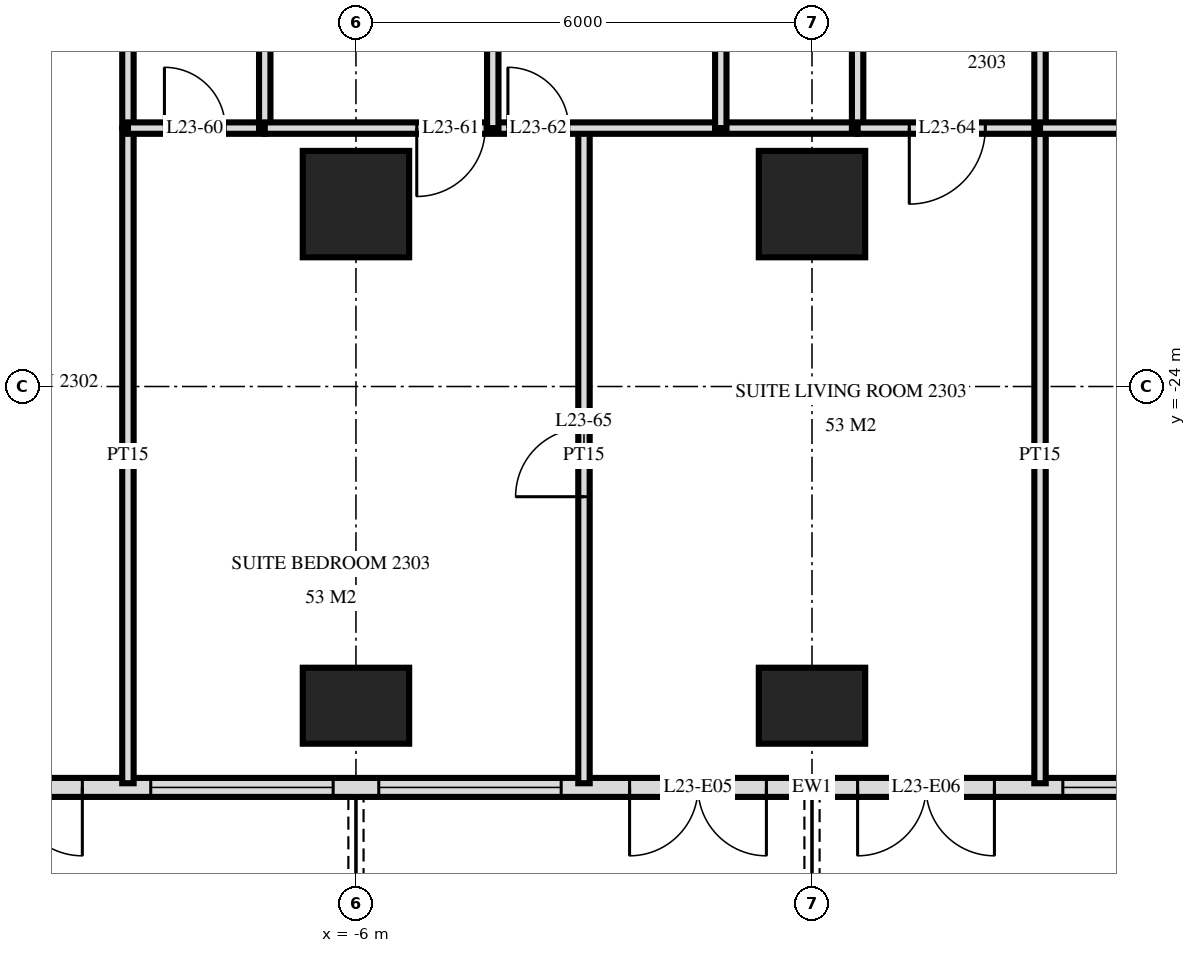
"""IFC4 building model, lengths in metres.
Left out: names, types, materials, properties, quantities, classifications, styles, units other than length and angle.
Written with IfcOpenShell. Run it as: python <this file> out.ifc"""

import sys

from ifc_helpers import new_model, si_unit, direction, frame, frame_2d, origin, origin_2d, place, context, subcontext, project, spatial, rectangle, extrude, element, fill, save


model = new_model("IFC4")
c1 = context("Model", 3, precision=1e-05, world=origin(), true_north=direction((0.0, 1.0)))
c2 = subcontext(c1, "Body", "Model", "MODEL_VIEW")
j1 = project(units=[si_unit("LENGTHUNIT", "METRE"), si_unit("PLANEANGLEUNIT", "RADIAN")], contexts=[c1])
p1 = place(None, origin())
s1 = spatial("IfcSite", under=j1, at=p1, CompositionType="ELEMENT")
p2 = place(p1, origin())
s2 = spatial("IfcBuilding", under=s1, at=p2, CompositionType="ELEMENT")
p3 = place(p2, frame((0.0, 0.0, 92.4)))
s3 = spatial("IfcBuildingStorey", under=s2, at=p3, CompositionType="ELEMENT", Elevation=92.4)
p4 = place(p3, frame((-6.0, -28.2, 0.0), z_axis=(0.0, 0.0, 1.0), x_axis=(1.0, 0.0, 0.0)))
e1 = element("IfcColumn", 1, at=p4, inside=s3, PredefinedType="COLUMN", context=c2, shape_type="SweptSolid", body=[
    extrude(rectangle(XDim=1.4, YDim=1.0, at=origin_2d()), origin(), (0.0, 0.0, 1.0), 3.6),
])
p5 = place(p3, frame((-6.0, -21.6, 0.0), z_axis=(0.0, 0.0, 1.0), x_axis=(1.0, 0.0, 0.0)))
e2 = element("IfcColumn", 2, at=p5, inside=s3, PredefinedType="COLUMN", context=c2, shape_type="SweptSolid", body=[
    extrude(rectangle(XDim=1.4, YDim=1.4, at=origin_2d()), origin(), (0.0, 0.0, 1.0), 3.6),
])
p6 = place(p3, frame((0.0, -28.2, 0.0), z_axis=(0.0, 0.0, 1.0), x_axis=(1.0, 0.0, 0.0)))
e3 = element("IfcColumn", 3, at=p6, inside=s3, PredefinedType="COLUMN", context=c2, shape_type="SweptSolid", body=[
    extrude(rectangle(XDim=1.4, YDim=1.0, at=origin_2d()), origin(), (0.0, 0.0, 1.0), 3.6),
])
p7 = place(p3, frame((0.0, -21.6, 0.0), z_axis=(0.0, 0.0, 1.0), x_axis=(1.0, 0.0, 0.0)))
e4 = element("IfcColumn", 4, at=p7, inside=s3, PredefinedType="COLUMN", context=c2, shape_type="SweptSolid", body=[
    extrude(rectangle(XDim=1.4, YDim=1.4, at=origin_2d()), origin(), (0.0, 0.0, 1.0), 3.6),
])
p8 = place(p3, frame((-28.775, -29.275, 0.0), z_axis=(0.0, 0.0, 1.0), x_axis=(1.0, 0.0, 0.0)))
e5 = element("IfcWall", 5, at=p8, inside=s3, PredefinedType="SOLIDWALL", context=c2, shape_type="SweptSolid", body=[
    extrude(rectangle(XDim=57.551, YDim=0.25, at=frame_2d((28.775, 0.0))), origin(), (0.0, 0.0, 1.0), 3.32),
])
p9 = place(p8, frame((0.575, 0.0, 0.0)))
e6 = element("IfcOpeningElement", 6, at=p9, cuts=e5, PredefinedType="OPENING", context=c2, shape_type="SweptSolid", body=[
    extrude(rectangle(XDim=1.8, YDim=2.4, at=frame_2d((0.9, 1.2))), frame((0.0, 0.135, 0.0), z_axis=(0.0, -1.0, 0.0), x_axis=(1.0, 0.0, 0.0)), (0.0, 0.0, 1.0), 0.27),
])
p10 = place(p8, frame((5.075, 0.0, 0.3)))
e7 = element("IfcOpeningElement", 7, at=p10, cuts=e5, PredefinedType="OPENING", context=c2, shape_type="SweptSolid", body=[
    extrude(rectangle(XDim=2.4, YDim=2.1, at=frame_2d((1.2, 1.05))), frame((0.0, 0.135, 0.0), z_axis=(0.0, -1.0, 0.0), x_axis=(1.0, 0.0, 0.0)), (0.0, 0.0, 1.0), 0.27),
])
p11 = place(p8, frame((8.375, 0.0, 0.0)))
e8 = element("IfcOpeningElement", 8, at=p11, cuts=e5, PredefinedType="OPENING", context=c2, shape_type="SweptSolid", body=[
    extrude(rectangle(XDim=1.8, YDim=2.4, at=frame_2d((0.9, 1.2))), frame((0.0, 0.135, 0.0), z_axis=(0.0, -1.0, 0.0), x_axis=(1.0, 0.0, 0.0)), (0.0, 0.0, 1.0), 0.27),
])
p12 = place(p8, frame((11.375, 0.0, 0.0)))
e9 = element("IfcOpeningElement", 9, at=p12, cuts=e5, PredefinedType="OPENING", context=c2, shape_type="SweptSolid", body=[
    extrude(rectangle(XDim=1.8, YDim=2.4, at=frame_2d((0.9, 1.2))), frame((0.0, 0.135, 0.0), z_axis=(0.0, -1.0, 0.0), x_axis=(1.0, 0.0, 0.0)), (0.0, 0.0, 1.0), 0.27),
])
p13 = place(p8, frame((14.075, 0.0, 0.3)))
e10 = element("IfcOpeningElement", 10, at=p13, cuts=e5, PredefinedType="OPENING", context=c2, shape_type="SweptSolid", body=[
    extrude(rectangle(XDim=2.4, YDim=2.1, at=frame_2d((1.2, 1.05))), frame((0.0, 0.135, 0.0), z_axis=(0.0, -1.0, 0.0), x_axis=(1.0, 0.0, 0.0)), (0.0, 0.0, 1.0), 0.27),
])
p14 = place(p8, frame((17.375, 0.0, 0.0)))
e11 = element("IfcOpeningElement", 11, at=p14, cuts=e5, PredefinedType="OPENING", context=c2, shape_type="SweptSolid", body=[
    extrude(rectangle(XDim=1.8, YDim=2.4, at=frame_2d((0.9, 1.2))), frame((0.0, 0.135, 0.0), z_axis=(0.0, -1.0, 0.0), x_axis=(1.0, 0.0, 0.0)), (0.0, 0.0, 1.0), 0.27),
])
p15 = place(p8, frame((20.075, 0.0, 0.3)))
e12 = element("IfcOpeningElement", 12, at=p15, cuts=e5, PredefinedType="OPENING", context=c2, shape_type="SweptSolid", body=[
    extrude(rectangle(XDim=2.4, YDim=2.1, at=frame_2d((1.2, 1.05))), frame((0.0, 0.135, 0.0), z_axis=(0.0, -1.0, 0.0), x_axis=(1.0, 0.0, 0.0)), (0.0, 0.0, 1.0), 0.27),
])
p16 = place(p8, frame((23.075, 0.0, 0.3)))
e13 = element("IfcOpeningElement", 13, at=p16, cuts=e5, PredefinedType="OPENING", context=c2, shape_type="SweptSolid", body=[
    extrude(rectangle(XDim=2.4, YDim=2.1, at=frame_2d((1.2, 1.05))), frame((0.0, 0.135, 0.0), z_axis=(0.0, -1.0, 0.0), x_axis=(1.0, 0.0, 0.0)), (0.0, 0.0, 1.0), 0.27),
])
p17 = place(p8, frame((26.375, 0.0, 0.0)))
e14 = element("IfcOpeningElement", 14, at=p17, cuts=e5, PredefinedType="OPENING", context=c2, shape_type="SweptSolid", body=[
    extrude(rectangle(XDim=1.8, YDim=2.4, at=frame_2d((0.9, 1.2))), frame((0.0, 0.135, 0.0), z_axis=(0.0, -1.0, 0.0), x_axis=(1.0, 0.0, 0.0)), (0.0, 0.0, 1.0), 0.27),
])
p18 = place(p8, frame((29.375, 0.0, 0.0)))
e15 = element("IfcOpeningElement", 15, at=p18, cuts=e5, PredefinedType="OPENING", context=c2, shape_type="SweptSolid", body=[
    extrude(rectangle(XDim=1.8, YDim=2.4, at=frame_2d((0.9, 1.2))), frame((0.0, 0.135, 0.0), z_axis=(0.0, -1.0, 0.0), x_axis=(1.0, 0.0, 0.0)), (0.0, 0.0, 1.0), 0.27),
])
p19 = place(p8, frame((32.075, 0.0, 0.3)))
e16 = element("IfcOpeningElement", 16, at=p19, cuts=e5, PredefinedType="OPENING", context=c2, shape_type="SweptSolid", body=[
    extrude(rectangle(XDim=2.4, YDim=2.1, at=frame_2d((1.2, 1.05))), frame((0.0, 0.135, 0.0), z_axis=(0.0, -1.0, 0.0), x_axis=(1.0, 0.0, 0.0)), (0.0, 0.0, 1.0), 0.27),
])
p20 = place(p8, frame((35.375, 0.0, 0.0)))
e17 = element("IfcOpeningElement", 17, at=p20, cuts=e5, PredefinedType="OPENING", context=c2, shape_type="SweptSolid", body=[
    extrude(rectangle(XDim=1.8, YDim=2.4, at=frame_2d((0.9, 1.2))), frame((0.0, 0.135, 0.0), z_axis=(0.0, -1.0, 0.0), x_axis=(1.0, 0.0, 0.0)), (0.0, 0.0, 1.0), 0.27),
])
p21 = place(p8, frame((38.075, 0.0, 0.3)))
e18 = element("IfcOpeningElement", 18, at=p21, cuts=e5, PredefinedType="OPENING", context=c2, shape_type="SweptSolid", body=[
    extrude(rectangle(XDim=2.4, YDim=2.1, at=frame_2d((1.2, 1.05))), frame((0.0, 0.135, 0.0), z_axis=(0.0, -1.0, 0.0), x_axis=(1.0, 0.0, 0.0)), (0.0, 0.0, 1.0), 0.27),
])
p22 = place(p8, frame((41.075, 0.0, 0.3)))
e19 = element("IfcOpeningElement", 19, at=p22, cuts=e5, PredefinedType="OPENING", context=c2, shape_type="SweptSolid", body=[
    extrude(rectangle(XDim=2.4, YDim=2.1, at=frame_2d((1.2, 1.05))), frame((0.0, 0.135, 0.0), z_axis=(0.0, -1.0, 0.0), x_axis=(1.0, 0.0, 0.0)), (0.0, 0.0, 1.0), 0.27),
])
p23 = place(p8, frame((44.375, 0.0, 0.0)))
e20 = element("IfcOpeningElement", 20, at=p23, cuts=e5, PredefinedType="OPENING", context=c2, shape_type="SweptSolid", body=[
    extrude(rectangle(XDim=1.8, YDim=2.4, at=frame_2d((0.9, 1.2))), frame((0.0, 0.135, 0.0), z_axis=(0.0, -1.0, 0.0), x_axis=(1.0, 0.0, 0.0)), (0.0, 0.0, 1.0), 0.27),
])
p24 = place(p8, frame((47.075, 0.0, 0.3)))
e21 = element("IfcOpeningElement", 21, at=p24, cuts=e5, PredefinedType="OPENING", context=c2, shape_type="SweptSolid", body=[
    extrude(rectangle(XDim=2.4, YDim=2.1, at=frame_2d((1.2, 1.05))), frame((0.0, 0.135, 0.0), z_axis=(0.0, -1.0, 0.0), x_axis=(1.0, 0.0, 0.0)), (0.0, 0.0, 1.0), 0.27),
])
p25 = place(p8, frame((50.375, 0.0, 0.0)))
e22 = element("IfcOpeningElement", 22, at=p25, cuts=e5, PredefinedType="OPENING", context=c2, shape_type="SweptSolid", body=[
    extrude(rectangle(XDim=1.8, YDim=2.4, at=frame_2d((0.9, 1.2))), frame((0.0, 0.135, 0.0), z_axis=(0.0, -1.0, 0.0), x_axis=(1.0, 0.0, 0.0)), (0.0, 0.0, 1.0), 0.27),
])
p26 = place(p8, frame((53.375, 0.0, 0.0)))
e23 = element("IfcOpeningElement", 23, at=p26, cuts=e5, PredefinedType="OPENING", context=c2, shape_type="SweptSolid", body=[
    extrude(rectangle(XDim=1.8, YDim=2.4, at=frame_2d((0.9, 1.2))), frame((0.0, 0.135, 0.0), z_axis=(0.0, -1.0, 0.0), x_axis=(1.0, 0.0, 0.0)), (0.0, 0.0, 1.0), 0.27),
])
p27 = place(p3, frame((3.0, -20.6, 0.0), z_axis=(0.0, 0.0, 1.0), x_axis=(0.0, 1.0, 0.0)))
e24 = element("IfcWall", 24, at=p27, inside=s3, PredefinedType="PARTITIONING", context=c2, shape_type="SweptSolid", body=[
    extrude(rectangle(XDim=3.6, YDim=0.15, at=frame_2d((1.8, 0.0))), origin(), (0.0, 0.0, 1.0), 3.32),
])
p28 = place(p3, frame((3.0, -29.22, 0.0), z_axis=(0.0, 0.0, 1.0), x_axis=(0.0, 1.0, 0.0)))
e25 = element("IfcWall", 25, at=p28, inside=s3, PredefinedType="PARTITIONING", context=c2, shape_type="SweptSolid", body=[
    extrude(rectangle(XDim=8.62, YDim=0.15, at=frame_2d((4.31, 0.0))), origin(), (0.0, 0.0, 1.0), 3.32),
])
p29 = place(p3, frame((0.6, -20.6, 0.0), z_axis=(0.0, 0.0, 1.0), x_axis=(0.0, 1.0, 0.0)))
e26 = element("IfcWall", 26, at=p29, inside=s3, PredefinedType="PARTITIONING", context=c2, shape_type="SweptSolid", body=[
    extrude(rectangle(XDim=3.6, YDim=0.15, at=frame_2d((1.8, 0.0))), origin(), (0.0, 0.0, 1.0), 3.32),
])
p30 = place(p29, frame((1.28, 0.0, 0.0)))
e27 = element("IfcOpeningElement", 27, at=p30, cuts=e26, PredefinedType="OPENING", context=c2, shape_type="SweptSolid", body=[
    extrude(rectangle(XDim=1.0, YDim=2.1, at=frame_2d((0.5, 1.05))), frame((0.0, 0.085, 0.0), z_axis=(0.0, -1.0, 0.0), x_axis=(1.0, 0.0, 0.0)), (0.0, 0.0, 1.0), 0.17),
])
p31 = place(p3, frame((-1.2, -20.6, 0.0), z_axis=(0.0, 0.0, 1.0), x_axis=(0.0, 1.0, 0.0)))
e28 = element("IfcWall", 28, at=p31, inside=s3, PredefinedType="PARTITIONING", context=c2, shape_type="SweptSolid", body=[
    extrude(rectangle(XDim=3.6, YDim=0.15, at=frame_2d((1.8, 0.0))), origin(), (0.0, 0.0, 1.0), 3.32),
])
p32 = place(p3, frame((-3.0, -29.22, 0.0), z_axis=(0.0, 0.0, 1.0), x_axis=(0.0, 1.0, 0.0)))
e29 = element("IfcWall", 29, at=p32, inside=s3, PredefinedType="PARTITIONING", context=c2, shape_type="SweptSolid", body=[
    extrude(rectangle(XDim=8.62, YDim=0.15, at=frame_2d((4.31, 0.0))), origin(), (0.0, 0.0, 1.0), 3.32),
])
p33 = place(p32, frame((3.77, 0.0, 0.0)))
e30 = element("IfcOpeningElement", 30, at=p33, cuts=e29, PredefinedType="OPENING", context=c2, shape_type="SweptSolid", body=[
    extrude(rectangle(XDim=0.9, YDim=2.1, at=frame_2d((0.45, 1.05))), frame((0.0, 0.085, 0.0), z_axis=(0.0, -1.0, 0.0), x_axis=(1.0, 0.0, 0.0)), (0.0, 0.0, 1.0), 0.17),
])
p34 = place(p3, frame((-4.2, -20.6, 0.0), z_axis=(0.0, 0.0, 1.0), x_axis=(0.0, 1.0, 0.0)))
e31 = element("IfcWall", 31, at=p34, inside=s3, PredefinedType="PARTITIONING", context=c2, shape_type="SweptSolid", body=[
    extrude(rectangle(XDim=3.6, YDim=0.15, at=frame_2d((1.8, 0.0))), origin(), (0.0, 0.0, 1.0), 3.32),
])
p35 = place(p3, frame((-7.2, -20.6, 0.0), z_axis=(0.0, 0.0, 1.0), x_axis=(0.0, 1.0, 0.0)))
e32 = element("IfcWall", 32, at=p35, inside=s3, PredefinedType="PLUMBINGWALL", context=c2, shape_type="SweptSolid", body=[
    extrude(rectangle(XDim=3.6, YDim=0.15, at=frame_2d((1.8, 0.0))), origin(), (0.0, 0.0, 1.0), 3.32),
])
p36 = place(p3, frame((-9.0, -29.22, 0.0), z_axis=(0.0, 0.0, 1.0), x_axis=(0.0, 1.0, 0.0)))
e33 = element("IfcWall", 33, at=p36, inside=s3, PredefinedType="PARTITIONING", context=c2, shape_type="SweptSolid", body=[
    extrude(rectangle(XDim=8.62, YDim=0.15, at=frame_2d((4.31, 0.0))), origin(), (0.0, 0.0, 1.0), 3.32),
])
p37 = place(p3, frame((-9.0, -20.6, 0.0), z_axis=(0.0, 0.0, 1.0), x_axis=(0.0, 1.0, 0.0)))
e34 = element("IfcWall", 34, at=p37, inside=s3, PredefinedType="PLUMBINGWALL", context=c2, shape_type="SweptSolid", body=[
    extrude(rectangle(XDim=3.6, YDim=0.15, at=frame_2d((1.8, 0.0))), origin(), (0.0, 0.0, 1.0), 3.32),
])
p38 = place(p3, frame((0.6, -20.6, 0.0), z_axis=(0.0, 0.0, 1.0), x_axis=(1.0, 0.0, 0.0)))
e35 = element("IfcWall", 35, at=p38, inside=s3, PredefinedType="PARTITIONING", context=c2, shape_type="SweptSolid", body=[
    extrude(rectangle(XDim=2.4, YDim=0.15, at=frame_2d((1.2, 0.0))), origin(), (0.0, 0.0, 1.0), 3.32),
])
p39 = place(p38, frame((0.68, 0.0, 0.0)))
e36 = element("IfcOpeningElement", 36, at=p39, cuts=e35, PredefinedType="OPENING", context=c2, shape_type="SweptSolid", body=[
    extrude(rectangle(XDim=1.0, YDim=2.1, at=frame_2d((0.5, 1.05))), frame((0.0, 0.085, 0.0), z_axis=(0.0, -1.0, 0.0), x_axis=(1.0, 0.0, 0.0)), (0.0, 0.0, 1.0), 0.17),
])
p40 = place(p3, frame((-7.2, -20.6, 0.0), z_axis=(0.0, 0.0, 1.0), x_axis=(1.0, 0.0, 0.0)))
e37 = element("IfcWall", 37, at=p40, inside=s3, PredefinedType="PARTITIONING", context=c2, shape_type="SweptSolid", body=[
    extrude(rectangle(XDim=7.8, YDim=0.15, at=frame_2d((3.9, 0.0))), origin(), (0.0, 0.0, 1.0), 3.32),
])
p41 = place(p40, frame((2.0, 0.0, 0.0)))
e38 = element("IfcOpeningElement", 38, at=p41, cuts=e37, PredefinedType="OPENING", context=c2, shape_type="SweptSolid", body=[
    extrude(rectangle(XDim=0.9, YDim=2.1, at=frame_2d((0.45, 1.05))), frame((0.0, 0.085, 0.0), z_axis=(0.0, -1.0, 0.0), x_axis=(1.0, 0.0, 0.0)), (0.0, 0.0, 1.0), 0.17),
])
p42 = place(p40, frame((3.199, 0.0, 0.0)))
e39 = element("IfcOpeningElement", 39, at=p42, cuts=e37, PredefinedType="OPENING", context=c2, shape_type="SweptSolid", body=[
    extrude(rectangle(XDim=0.8, YDim=2.1, at=frame_2d((0.4, 1.05))), frame((0.0, 0.085, 0.0), z_axis=(0.0, -1.0, 0.0), x_axis=(1.0, 0.0, 0.0)), (0.0, 0.0, 1.0), 0.17),
])
p43 = place(p3, frame((3.0, -20.6, 0.0), z_axis=(0.0, 0.0, 1.0), x_axis=(1.0, 0.0, 0.0)))
e40 = element("IfcWall", 40, at=p43, inside=s3, PredefinedType="PARTITIONING", context=c2, shape_type="SweptSolid", body=[
    extrude(rectangle(XDim=2.7, YDim=0.15, at=frame_2d((1.35, 0.0))), origin(), (0.0, 0.0, 1.0), 3.32),
])
p44 = place(p3, frame((-9.0, -20.6, 0.0), z_axis=(0.0, 0.0, 1.0), x_axis=(1.0, 0.0, 0.0)))
e41 = element("IfcWall", 41, at=p44, inside=s3, PredefinedType="PLUMBINGWALL", context=c2, shape_type="SweptSolid", body=[
    extrude(rectangle(XDim=1.8, YDim=0.15, at=frame_2d((0.9, 0.0))), origin(), (0.0, 0.0, 1.0), 3.32),
])
p45 = place(p44, frame((0.48, 0.0, 0.0)))
e42 = element("IfcOpeningElement", 42, at=p45, cuts=e41, PredefinedType="OPENING", context=c2, shape_type="SweptSolid", body=[
    extrude(rectangle(XDim=0.8, YDim=2.1, at=frame_2d((0.4, 1.05))), frame((0.0, 0.085, 0.0), z_axis=(0.0, -1.0, 0.0), x_axis=(1.0, 0.0, 0.0)), (0.0, 0.0, 1.0), 0.17),
])
p46 = place(p14, frame((0.9, 0.0, 0.0), z_axis=(0.0, 0.0, 1.0), x_axis=(-1.0, 0.0, 0.0)))
e43 = element("IfcDoor", 43, at=p46, inside=s3, OperationType="DOUBLE_DOOR_SINGLE_SWING", PredefinedType="DOOR", context=c2, shape_type="SweptSolid", body=[
    extrude(rectangle(XDim=1.8, YDim=2.4, at=frame_2d((0.0, 1.2))), frame((0.0, -0.025, 0.0), z_axis=(0.0, 1.0, 0.0), x_axis=(-1.0, 0.0, 0.0)), (0.0, 0.0, 1.0), 0.05),
])
fill(e11, e43)
p47 = place(p15, origin())
e44 = element("IfcWindow", 44, at=p47, inside=s3, PartitioningType="SINGLE_PANEL", PredefinedType="WINDOW", context=c2, shape_type="SweptSolid", body=[
    extrude(rectangle(XDim=2.4, YDim=2.1, at=frame_2d((1.2, 1.05))), frame((0.0, 0.03, 0.0), z_axis=(0.0, -1.0, 0.0), x_axis=(1.0, 0.0, 0.0)), (0.0, 0.0, 1.0), 0.06),
])
fill(e12, e44)
p48 = place(p16, origin())
e45 = element("IfcWindow", 45, at=p48, inside=s3, PartitioningType="SINGLE_PANEL", PredefinedType="WINDOW", context=c2, shape_type="SweptSolid", body=[
    extrude(rectangle(XDim=2.4, YDim=2.1, at=frame_2d((1.2, 1.05))), frame((0.0, 0.03, 0.0), z_axis=(0.0, -1.0, 0.0), x_axis=(1.0, 0.0, 0.0)), (0.0, 0.0, 1.0), 0.06),
])
fill(e13, e45)
p49 = place(p17, frame((0.9, 0.0, 0.0), z_axis=(0.0, 0.0, 1.0), x_axis=(-1.0, 0.0, 0.0)))
e46 = element("IfcDoor", 46, at=p49, inside=s3, OperationType="DOUBLE_DOOR_SINGLE_SWING", PredefinedType="DOOR", context=c2, shape_type="SweptSolid", body=[
    extrude(rectangle(XDim=1.8, YDim=2.4, at=frame_2d((0.0, 1.2))), frame((0.0, -0.025, 0.0), z_axis=(0.0, 1.0, 0.0), x_axis=(-1.0, 0.0, 0.0)), (0.0, 0.0, 1.0), 0.05),
])
fill(e14, e46)
p50 = place(p18, frame((0.9, 0.0, 0.0), z_axis=(0.0, 0.0, 1.0), x_axis=(-1.0, 0.0, 0.0)))
e47 = element("IfcDoor", 47, at=p50, inside=s3, OperationType="DOUBLE_DOOR_SINGLE_SWING", PredefinedType="DOOR", context=c2, shape_type="SweptSolid", body=[
    extrude(rectangle(XDim=1.8, YDim=2.4, at=frame_2d((0.0, 1.2))), frame((0.0, -0.025, 0.0), z_axis=(0.0, 1.0, 0.0), x_axis=(-1.0, 0.0, 0.0)), (0.0, 0.0, 1.0), 0.05),
])
fill(e15, e47)
p51 = place(p19, origin())
e48 = element("IfcWindow", 48, at=p51, inside=s3, PartitioningType="SINGLE_PANEL", PredefinedType="WINDOW", context=c2, shape_type="SweptSolid", body=[
    extrude(rectangle(XDim=2.4, YDim=2.1, at=frame_2d((1.2, 1.05))), frame((0.0, 0.03, 0.0), z_axis=(0.0, -1.0, 0.0), x_axis=(1.0, 0.0, 0.0)), (0.0, 0.0, 1.0), 0.06),
])
fill(e16, e48)
p52 = place(p45, origin())
e49 = element("IfcDoor", 49, at=p52, inside=s3, OperationType="SINGLE_SWING_RIGHT", PredefinedType="DOOR", context=c2, shape_type="SweptSolid", body=[
    extrude(rectangle(XDim=0.8, YDim=2.1, at=frame_2d((0.4, 1.05))), frame((0.0, 0.025, 0.0), z_axis=(0.0, -1.0, 0.0), x_axis=(1.0, 0.0, 0.0)), (0.0, 0.0, 1.0), 0.05),
])
fill(e42, e49)
p53 = place(p41, frame((0.45, 0.0, 0.0), z_axis=(0.0, 0.0, 1.0), x_axis=(-1.0, 0.0, 0.0)))
e50 = element("IfcDoor", 50, at=p53, inside=s3, OperationType="SINGLE_SWING_LEFT", PredefinedType="DOOR", context=c2, shape_type="SweptSolid", body=[
    extrude(rectangle(XDim=0.9, YDim=2.1, at=frame_2d((0.0, 1.05))), frame((0.0, -0.025, 0.0), z_axis=(0.0, 1.0, 0.0), x_axis=(-1.0, 0.0, 0.0)), (0.0, 0.0, 1.0), 0.05),
])
fill(e38, e50)
p54 = place(p42, origin())
e51 = element("IfcDoor", 51, at=p54, inside=s3, OperationType="SINGLE_SWING_RIGHT", PredefinedType="DOOR", context=c2, shape_type="SweptSolid", body=[
    extrude(rectangle(XDim=0.8, YDim=2.1, at=frame_2d((0.4, 1.05))), frame((0.0, 0.025, 0.0), z_axis=(0.0, -1.0, 0.0), x_axis=(1.0, 0.0, 0.0)), (0.0, 0.0, 1.0), 0.05),
])
fill(e39, e51)
p55 = place(p39, frame((0.5, 0.0, 0.0), z_axis=(0.0, 0.0, 1.0), x_axis=(-1.0, 0.0, 0.0)))
e52 = element("IfcDoor", 52, at=p55, inside=s3, OperationType="SINGLE_SWING_LEFT", PredefinedType="DOOR", context=c2, shape_type="SweptSolid", body=[
    extrude(rectangle(XDim=1.0, YDim=2.1, at=frame_2d((0.0, 1.05))), frame((0.0, -0.025, 0.0), z_axis=(0.0, 1.0, 0.0), x_axis=(-1.0, 0.0, 0.0)), (0.0, 0.0, 1.0), 0.05),
])
fill(e36, e52)
p56 = place(p33, origin())
e53 = element("IfcDoor", 53, at=p56, inside=s3, OperationType="SINGLE_SWING_RIGHT", PredefinedType="DOOR", context=c2, shape_type="SweptSolid", body=[
    extrude(rectangle(XDim=0.9, YDim=2.1, at=frame_2d((0.45, 1.05))), frame((0.0, 0.025, 0.0), z_axis=(0.0, -1.0, 0.0), x_axis=(1.0, 0.0, 0.0)), (0.0, 0.0, 1.0), 0.05),
])
fill(e30, e53)
save(model, sys.argv[1])
